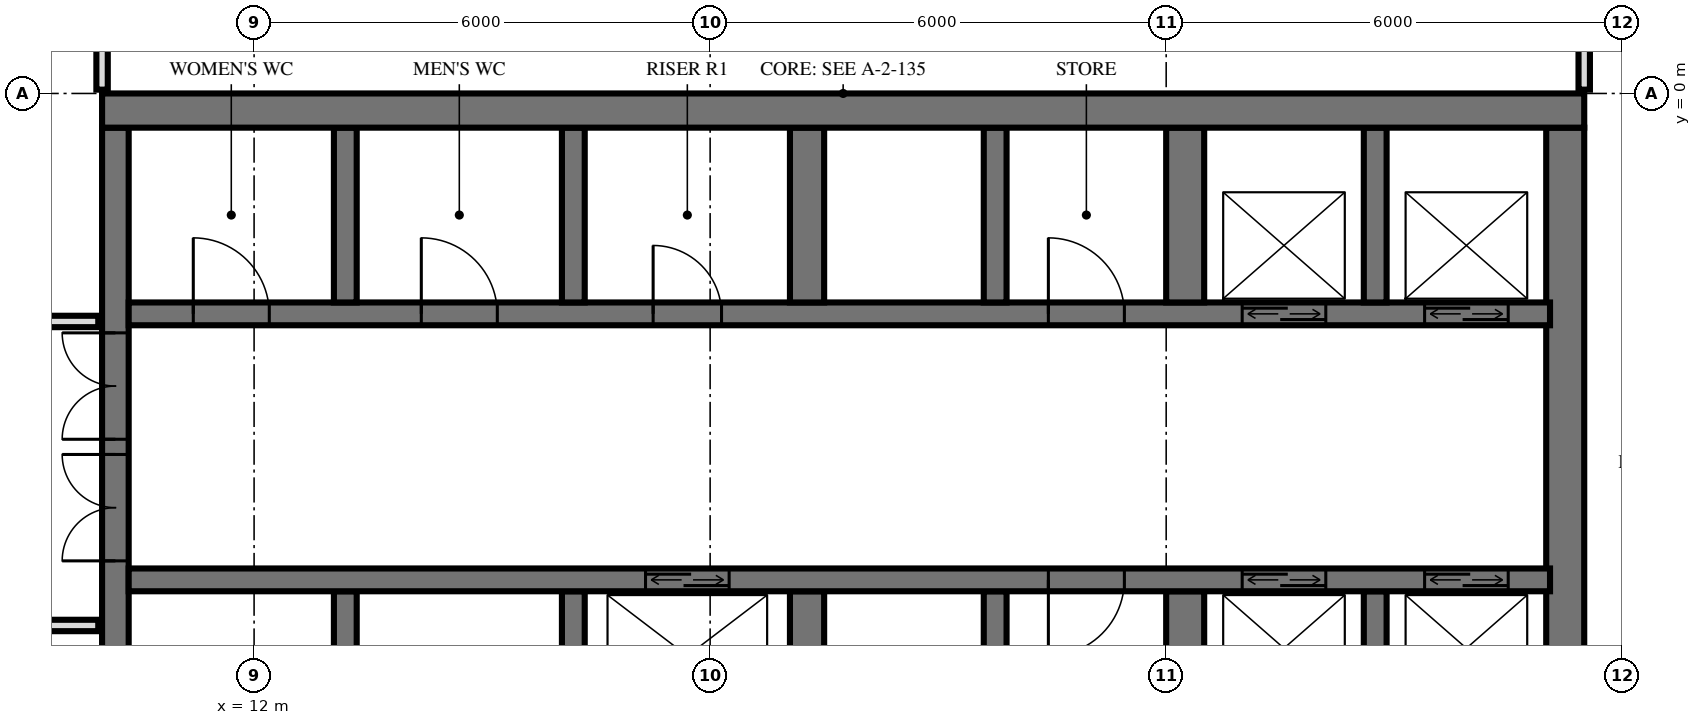
"""IFC4 building model, lengths in metres.
Left out: names, types, materials, properties, quantities, classifications, styles, units other than length and angle.
Written with IfcOpenShell. Run it as: python <this file> out.ifc"""

import sys

from ifc_helpers import new_model, si_unit, direction, frame, frame_2d, origin, place, context, subcontext, project, spatial, rectangle, extrude, element, fill, save


model = new_model("IFC4")
c1 = context("Model", 3, precision=1e-05, world=origin(), true_north=direction((0.0, 1.0)))
c2 = subcontext(c1, "Body", "Model", "MODEL_VIEW")
j1 = project(units=[si_unit("LENGTHUNIT", "METRE"), si_unit("PLANEANGLEUNIT", "RADIAN")], contexts=[c1])
p1 = place(None, origin())
s1 = spatial("IfcSite", under=j1, at=p1, CompositionType="ELEMENT")
p2 = place(p1, origin())
s2 = spatial("IfcBuilding", under=s1, at=p2, CompositionType="ELEMENT")
p3 = place(p2, frame((0.0, 0.0, 56.4)))
s3 = spatial("IfcBuildingStorey", under=s2, at=p3, CompositionType="ELEMENT", Elevation=56.4)
p4 = place(p3, frame((10.0, -0.225, 0.0), z_axis=(0.0, 0.0, 1.0), x_axis=(1.0, 0.0, 0.0)))
e1 = element("IfcWall", 1, at=p4, inside=s3, PredefinedType="SHEAR", context=c2, shape_type="SweptSolid", body=[
    extrude(rectangle(XDim=19.5, YDim=0.45, at=frame_2d((9.75, 0.0))), origin(), (0.0, 0.0, 1.0), 3.6),
])
p5 = place(p3, frame((10.175, -14.55, 0.0), z_axis=(0.0, 0.0, 1.0), x_axis=(0.0, 1.0, 0.0)))
e2 = element("IfcWall", 2, at=p5, inside=s3, PredefinedType="SHEAR", context=c2, shape_type="SweptSolid", body=[
    extrude(rectangle(XDim=14.1, YDim=0.35, at=frame_2d((7.05, 0.0))), origin(), (0.0, 0.0, 1.0), 3.6),
])
p6 = place(p5, frame((8.4, 0.0, 0.0)))
e3 = element("IfcOpeningElement", 3, at=p6, cuts=e2, PredefinedType="OPENING", context=c2, shape_type="SweptSolid", body=[
    extrude(rectangle(XDim=1.4, YDim=2.4, at=frame_2d((0.7, 1.2))), frame((0.0, 0.185, 0.0), z_axis=(0.0, -1.0, 0.0), x_axis=(1.0, 0.0, 0.0)), (0.0, 0.0, 1.0), 0.37),
])
p7 = place(p5, frame((10.0, 0.0, 0.0)))
e4 = element("IfcOpeningElement", 4, at=p7, cuts=e2, PredefinedType="OPENING", context=c2, shape_type="SweptSolid", body=[
    extrude(rectangle(XDim=1.4, YDim=2.4, at=frame_2d((0.7, 1.2))), frame((0.0, 0.185, 0.0), z_axis=(0.0, -1.0, 0.0), x_axis=(1.0, 0.0, 0.0)), (0.0, 0.0, 1.0), 0.37),
])
p8 = place(p5, frame((4.0, 0.0, 0.0)))
e5 = element("IfcOpeningElement", 5, at=p8, cuts=e2, PredefinedType="OPENING", context=c2, shape_type="SweptSolid", body=[
    extrude(rectangle(XDim=1.2, YDim=2.1, at=frame_2d((0.6, 1.05))), frame((0.0, 0.185, 0.0), z_axis=(0.0, -1.0, 0.0), x_axis=(1.0, 0.0, 0.0)), (0.0, 0.0, 1.0), 0.37),
])
p9 = place(p3, frame((29.25, -14.55, 0.0), z_axis=(0.0, 0.0, 1.0), x_axis=(0.0, 1.0, 0.0)))
e6 = element("IfcWall", 6, at=p9, inside=s3, PredefinedType="SHEAR", context=c2, shape_type="SweptSolid", body=[
    extrude(rectangle(XDim=14.1, YDim=0.5, at=frame_2d((7.05, 0.0))), origin(), (0.0, 0.0, 1.0), 3.6),
])
p10 = place(p3, frame((10.35, -2.9, 0.0), z_axis=(0.0, 0.0, 1.0), x_axis=(1.0, 0.0, 0.0)))
e7 = element("IfcWall", 7, at=p10, inside=s3, PredefinedType="SHEAR", context=c2, shape_type="SweptSolid", body=[
    extrude(rectangle(XDim=18.7, YDim=0.3, at=frame_2d((9.35, 0.0))), origin(), (0.0, 0.0, 1.0), 3.6),
])
p11 = place(p10, frame((14.65, 0.0, 0.0)))
e8 = element("IfcOpeningElement", 8, at=p11, cuts=e7, PredefinedType="OPENING", context=c2, shape_type="SweptSolid", body=[
    extrude(rectangle(XDim=1.1, YDim=2.1, at=frame_2d((0.55, 1.05))), frame((0.0, 0.16, 0.0), z_axis=(0.0, -1.0, 0.0), x_axis=(1.0, 0.0, 0.0)), (0.0, 0.0, 1.0), 0.32),
])
p12 = place(p10, frame((17.05, 0.0, 0.0)))
e9 = element("IfcOpeningElement", 9, at=p12, cuts=e7, PredefinedType="OPENING", context=c2, shape_type="SweptSolid", body=[
    extrude(rectangle(XDim=1.1, YDim=2.1, at=frame_2d((0.55, 1.05))), frame((0.0, 0.16, 0.0), z_axis=(0.0, -1.0, 0.0), x_axis=(1.0, 0.0, 0.0)), (0.0, 0.0, 1.0), 0.32),
])
p13 = place(p10, frame((6.9, 0.0, 0.0)))
e10 = element("IfcOpeningElement", 10, at=p13, cuts=e7, PredefinedType="OPENING", context=c2, shape_type="SweptSolid", body=[
    extrude(rectangle(XDim=0.9, YDim=2.1, at=frame_2d((0.45, 1.05))), frame((0.0, 0.16, 0.0), z_axis=(0.0, -1.0, 0.0), x_axis=(1.0, 0.0, 0.0)), (0.0, 0.0, 1.0), 0.32),
])
p14 = place(p10, frame((0.85, 0.0, 0.0)))
e11 = element("IfcOpeningElement", 11, at=p14, cuts=e7, PredefinedType="OPENING", context=c2, shape_type="SweptSolid", body=[
    extrude(rectangle(XDim=1.0, YDim=2.1, at=frame_2d((0.5, 1.05))), frame((0.0, 0.16, 0.0), z_axis=(0.0, -1.0, 0.0), x_axis=(1.0, 0.0, 0.0)), (0.0, 0.0, 1.0), 0.32),
])
p15 = place(p10, frame((3.85, 0.0, 0.0)))
e12 = element("IfcOpeningElement", 12, at=p15, cuts=e7, PredefinedType="OPENING", context=c2, shape_type="SweptSolid", body=[
    extrude(rectangle(XDim=1.0, YDim=2.1, at=frame_2d((0.5, 1.05))), frame((0.0, 0.16, 0.0), z_axis=(0.0, -1.0, 0.0), x_axis=(1.0, 0.0, 0.0)), (0.0, 0.0, 1.0), 0.32),
])
p16 = place(p10, frame((12.1, 0.0, 0.0)))
e13 = element("IfcOpeningElement", 13, at=p16, cuts=e7, PredefinedType="OPENING", context=c2, shape_type="SweptSolid", body=[
    extrude(rectangle(XDim=1.0, YDim=2.1, at=frame_2d((0.5, 1.05))), frame((0.0, 0.16, 0.0), z_axis=(0.0, -1.0, 0.0), x_axis=(1.0, 0.0, 0.0)), (0.0, 0.0, 1.0), 0.32),
])
p17 = place(p3, frame((10.35, -6.4, 0.0), z_axis=(0.0, 0.0, 1.0), x_axis=(1.0, 0.0, 0.0)))
e14 = element("IfcWall", 14, at=p17, inside=s3, PredefinedType="SHEAR", context=c2, shape_type="SweptSolid", body=[
    extrude(rectangle(XDim=18.7, YDim=0.3, at=frame_2d((9.35, 0.0))), origin(), (0.0, 0.0, 1.0), 3.6),
])
p18 = place(p17, frame((14.65, 0.0, 0.0)))
e15 = element("IfcOpeningElement", 15, at=p18, cuts=e14, PredefinedType="OPENING", context=c2, shape_type="SweptSolid", body=[
    extrude(rectangle(XDim=1.1, YDim=2.1, at=frame_2d((0.55, 1.05))), frame((0.0, 0.16, 0.0), z_axis=(0.0, -1.0, 0.0), x_axis=(1.0, 0.0, 0.0)), (0.0, 0.0, 1.0), 0.32),
])
p19 = place(p17, frame((17.05, 0.0, 0.0)))
e16 = element("IfcOpeningElement", 16, at=p19, cuts=e14, PredefinedType="OPENING", context=c2, shape_type="SweptSolid", body=[
    extrude(rectangle(XDim=1.1, YDim=2.1, at=frame_2d((0.55, 1.05))), frame((0.0, 0.16, 0.0), z_axis=(0.0, -1.0, 0.0), x_axis=(1.0, 0.0, 0.0)), (0.0, 0.0, 1.0), 0.32),
])
p20 = place(p17, frame((6.8, 0.0, 0.0)))
e17 = element("IfcOpeningElement", 17, at=p20, cuts=e14, PredefinedType="OPENING", context=c2, shape_type="SweptSolid", body=[
    extrude(rectangle(XDim=1.1, YDim=2.1, at=frame_2d((0.55, 1.05))), frame((0.0, 0.16, 0.0), z_axis=(0.0, -1.0, 0.0), x_axis=(1.0, 0.0, 0.0)), (0.0, 0.0, 1.0), 0.32),
])
p21 = place(p17, frame((12.1, 0.0, 0.0)))
e18 = element("IfcOpeningElement", 18, at=p21, cuts=e14, PredefinedType="OPENING", context=c2, shape_type="SweptSolid", body=[
    extrude(rectangle(XDim=1.0, YDim=2.1, at=frame_2d((0.5, 1.05))), frame((0.0, 0.16, 0.0), z_axis=(0.0, -1.0, 0.0), x_axis=(1.0, 0.0, 0.0)), (0.0, 0.0, 1.0), 0.32),
])
for number, where, z_axis, x_axis in (
    (19, (13.2, -2.75, 0.0), (0.0, 0.0, 1.0), (0.0, 1.0, 0.0)),
    (20, (13.2, -8.85, 0.0), (0.0, 0.0, 1.0), (0.0, 1.0, 0.0)),
    (21, (16.2, -2.75, 0.0), (0.0, 0.0, 1.0), (0.0, 1.0, 0.0)),
    (22, (16.2, -8.85, 0.0), (0.0, 0.0, 1.0), (0.0, 1.0, 0.0)),
):
    element("IfcWall", number, at=place(p3, frame(where, z_axis=z_axis, x_axis=x_axis)), inside=s3, PredefinedType="SHEAR", context=c2, shape_type="SweptSolid", body=[
        extrude(rectangle(XDim=2.3, YDim=0.3, at=frame_2d((1.15, 0.0))), origin(), (0.0, 0.0, 1.0), 3.6),
    ])
for number, where, z_axis, x_axis in (
    (23, (19.275, -2.75, 0.0), (0.0, 0.0, 1.0), (0.0, 1.0, 0.0)),
    (24, (19.275, -8.85, 0.0), (0.0, 0.0, 1.0), (0.0, 1.0, 0.0)),
):
    element("IfcWall", number, at=place(p3, frame(where, z_axis=z_axis, x_axis=x_axis)), inside=s3, PredefinedType="SHEAR", context=c2, shape_type="SweptSolid", body=[
        extrude(rectangle(XDim=2.3, YDim=0.45, at=frame_2d((1.15, 0.0))), origin(), (0.0, 0.0, 1.0), 3.6),
    ])
for number, where, z_axis, x_axis in (
    (25, (21.75, -2.75, 0.0), (0.0, 0.0, 1.0), (0.0, 1.0, 0.0)),
    (26, (21.75, -8.85, 0.0), (0.0, 0.0, 1.0), (0.0, 1.0, 0.0)),
):
    element("IfcWall", number, at=place(p3, frame(where, z_axis=z_axis, x_axis=x_axis)), inside=s3, PredefinedType="SHEAR", context=c2, shape_type="SweptSolid", body=[
        extrude(rectangle(XDim=2.3, YDim=0.3, at=frame_2d((1.15, 0.0))), origin(), (0.0, 0.0, 1.0), 3.6),
    ])
for number, where, z_axis, x_axis in (
    (27, (24.25, -2.75, 0.0), (0.0, 0.0, 1.0), (0.0, 1.0, 0.0)),
    (28, (24.25, -8.85, 0.0), (0.0, 0.0, 1.0), (0.0, 1.0, 0.0)),
):
    element("IfcWall", number, at=place(p3, frame(where, z_axis=z_axis, x_axis=x_axis)), inside=s3, PredefinedType="SHEAR", context=c2, shape_type="SweptSolid", body=[
        extrude(rectangle(XDim=2.3, YDim=0.5, at=frame_2d((1.15, 0.0))), origin(), (0.0, 0.0, 1.0), 3.6),
    ])
for number, where, z_axis, x_axis in (
    (29, (26.75, -2.75, 0.0), (0.0, 0.0, 1.0), (0.0, 1.0, 0.0)),
    (30, (26.75, -8.85, 0.0), (0.0, 0.0, 1.0), (0.0, 1.0, 0.0)),
):
    element("IfcWall", number, at=place(p3, frame(where, z_axis=z_axis, x_axis=x_axis)), inside=s3, PredefinedType="SHEAR", context=c2, shape_type="SweptSolid", body=[
        extrude(rectangle(XDim=2.3, YDim=0.3, at=frame_2d((1.15, 0.0))), origin(), (0.0, 0.0, 1.0), 3.6),
    ])
p22 = place(p3, frame((29.5, 0.05, 0.0), z_axis=(0.0, 0.0, 1.0), x_axis=(0.0, 1.0, 0.0)))
e31 = element("IfcWall", 31, at=p22, inside=s3, PredefinedType="PARTITIONING", context=c2, shape_type="SweptSolid", body=[
    extrude(rectangle(XDim=0.827, YDim=0.15, at=frame_2d((0.414, 0.0))), origin(), (0.0, 0.0, 1.0), 3.32),
])
p23 = place(p3, frame((10.0, 0.05, 0.0), z_axis=(0.0, 0.0, 1.0), x_axis=(0.0, 1.0, 0.0)))
e32 = element("IfcWall", 32, at=p23, inside=s3, PredefinedType="PARTITIONING", context=c2, shape_type="SweptSolid", body=[
    extrude(rectangle(XDim=0.97, YDim=0.15, at=frame_2d((0.485, 0.0))), origin(), (0.0, 0.0, 1.0), 3.32),
])
p24 = place(p3, frame((-9.95, -7.0, 0.0), z_axis=(0.0, 0.0, 1.0), x_axis=(1.0, 0.0, 0.0)))
e33 = element("IfcWall", 33, at=p24, inside=s3, PredefinedType="PARTITIONING", context=c2, shape_type="SweptSolid", body=[
    extrude(rectangle(XDim=19.9, YDim=0.15, at=frame_2d((9.95, 0.0))), origin(), (0.0, 0.0, 1.0), 3.32),
])
p25 = place(p24, frame((9.45, 0.0, 0.0)))
e34 = element("IfcOpeningElement", 34, at=p25, cuts=e33, PredefinedType="OPENING", context=c2, shape_type="SweptSolid", body=[
    extrude(rectangle(XDim=1.0, YDim=2.1, at=frame_2d((0.5, 1.05))), frame((0.0, 0.085, 0.0), z_axis=(0.0, -1.0, 0.0), x_axis=(1.0, 0.0, 0.0)), (0.0, 0.0, 1.0), 0.17),
])
p26 = place(p24, frame((15.45, 0.0, 0.0)))
e35 = element("IfcOpeningElement", 35, at=p26, cuts=e33, PredefinedType="OPENING", context=c2, shape_type="SweptSolid", body=[
    extrude(rectangle(XDim=1.0, YDim=2.1, at=frame_2d((0.5, 1.05))), frame((0.0, 0.085, 0.0), z_axis=(0.0, -1.0, 0.0), x_axis=(1.0, 0.0, 0.0)), (0.0, 0.0, 1.0), 0.17),
])
p27 = place(p3, frame((-9.95, -3.0, 0.0), z_axis=(0.0, 0.0, 1.0), x_axis=(1.0, 0.0, 0.0)))
e36 = element("IfcWall", 36, at=p27, inside=s3, PredefinedType="PARTITIONING", context=c2, shape_type="SweptSolid", body=[
    extrude(rectangle(XDim=19.9, YDim=0.15, at=frame_2d((9.95, 0.0))), origin(), (0.0, 0.0, 1.0), 3.32),
])
p28 = place(p27, frame((0.95, 0.0, 0.0)))
e37 = element("IfcOpeningElement", 37, at=p28, cuts=e36, PredefinedType="OPENING", context=c2, shape_type="SweptSolid", body=[
    extrude(rectangle(XDim=1.0, YDim=2.1, at=frame_2d((0.5, 1.05))), frame((0.0, 0.085, 0.0), z_axis=(0.0, -1.0, 0.0), x_axis=(1.0, 0.0, 0.0)), (0.0, 0.0, 1.0), 0.17),
])
p29 = place(p27, frame((3.7, 0.0, 0.0)))
e38 = element("IfcOpeningElement", 38, at=p29, cuts=e36, PredefinedType="OPENING", context=c2, shape_type="SweptSolid", body=[
    extrude(rectangle(XDim=1.0, YDim=2.1, at=frame_2d((0.5, 1.05))), frame((0.0, 0.085, 0.0), z_axis=(0.0, -1.0, 0.0), x_axis=(1.0, 0.0, 0.0)), (0.0, 0.0, 1.0), 0.17),
])
p30 = place(p27, frame((7.95, 0.0, 0.0)))
e39 = element("IfcOpeningElement", 39, at=p30, cuts=e36, PredefinedType="OPENING", context=c2, shape_type="SweptSolid", body=[
    extrude(rectangle(XDim=1.0, YDim=2.1, at=frame_2d((0.5, 1.05))), frame((0.0, 0.085, 0.0), z_axis=(0.0, -1.0, 0.0), x_axis=(1.0, 0.0, 0.0)), (0.0, 0.0, 1.0), 0.17),
])
p31 = place(p27, frame((15.2, 0.0, 0.0)))
e40 = element("IfcOpeningElement", 40, at=p31, cuts=e36, PredefinedType="OPENING", context=c2, shape_type="SweptSolid", body=[
    extrude(rectangle(XDim=1.0, YDim=2.1, at=frame_2d((0.5, 1.05))), frame((0.0, 0.085, 0.0), z_axis=(0.0, -1.0, 0.0), x_axis=(1.0, 0.0, 0.0)), (0.0, 0.0, 1.0), 0.17),
])
p32 = place(p11, origin())
e41 = element("IfcDoor", 41, at=p32, inside=s3, OperationType="DOUBLE_DOOR_SLIDING", PredefinedType="USERDEFINED", context=c2, shape_type="SweptSolid", body=[
    extrude(rectangle(XDim=1.1, YDim=2.1, at=frame_2d((0.55, 1.05))), frame((0.0, 0.025, 0.0), z_axis=(0.0, -1.0, 0.0), x_axis=(1.0, 0.0, 0.0)), (0.0, 0.0, 1.0), 0.05),
])
fill(e8, e41)
p33 = place(p12, origin())
e42 = element("IfcDoor", 42, at=p33, inside=s3, OperationType="DOUBLE_DOOR_SLIDING", PredefinedType="USERDEFINED", context=c2, shape_type="SweptSolid", body=[
    extrude(rectangle(XDim=1.1, YDim=2.1, at=frame_2d((0.55, 1.05))), frame((0.0, 0.025, 0.0), z_axis=(0.0, -1.0, 0.0), x_axis=(1.0, 0.0, 0.0)), (0.0, 0.0, 1.0), 0.05),
])
fill(e9, e42)
p34 = place(p18, origin())
e43 = element("IfcDoor", 43, at=p34, inside=s3, OperationType="DOUBLE_DOOR_SLIDING", PredefinedType="USERDEFINED", context=c2, shape_type="SweptSolid", body=[
    extrude(rectangle(XDim=1.1, YDim=2.1, at=frame_2d((0.55, 1.05))), frame((0.0, 0.025, 0.0), z_axis=(0.0, -1.0, 0.0), x_axis=(1.0, 0.0, 0.0)), (0.0, 0.0, 1.0), 0.05),
])
fill(e15, e43)
p35 = place(p19, origin())
e44 = element("IfcDoor", 44, at=p35, inside=s3, OperationType="DOUBLE_DOOR_SLIDING", PredefinedType="USERDEFINED", context=c2, shape_type="SweptSolid", body=[
    extrude(rectangle(XDim=1.1, YDim=2.1, at=frame_2d((0.55, 1.05))), frame((0.0, 0.025, 0.0), z_axis=(0.0, -1.0, 0.0), x_axis=(1.0, 0.0, 0.0)), (0.0, 0.0, 1.0), 0.05),
])
fill(e16, e44)
p36 = place(p20, origin())
e45 = element("IfcDoor", 45, at=p36, inside=s3, OperationType="DOUBLE_DOOR_SLIDING", PredefinedType="USERDEFINED", context=c2, shape_type="SweptSolid", body=[
    extrude(rectangle(XDim=1.1, YDim=2.1, at=frame_2d((0.55, 1.05))), frame((0.0, 0.025, 0.0), z_axis=(0.0, -1.0, 0.0), x_axis=(1.0, 0.0, 0.0)), (0.0, 0.0, 1.0), 0.05),
])
fill(e17, e45)
p37 = place(p6, origin())
e46 = element("IfcDoor", 46, at=p37, inside=s3, OperationType="DOUBLE_DOOR_SINGLE_SWING", PredefinedType="DOOR", context=c2, shape_type="SweptSolid", body=[
    extrude(rectangle(XDim=1.4, YDim=2.4, at=frame_2d((0.7, 1.2))), frame((0.0, 0.025, 0.0), z_axis=(0.0, -1.0, 0.0), x_axis=(1.0, 0.0, 0.0)), (0.0, 0.0, 1.0), 0.05),
])
fill(e3, e46)
p38 = place(p7, origin())
e47 = element("IfcDoor", 47, at=p38, inside=s3, OperationType="DOUBLE_DOOR_SINGLE_SWING", PredefinedType="DOOR", context=c2, shape_type="SweptSolid", body=[
    extrude(rectangle(XDim=1.4, YDim=2.4, at=frame_2d((0.7, 1.2))), frame((0.0, 0.025, 0.0), z_axis=(0.0, -1.0, 0.0), x_axis=(1.0, 0.0, 0.0)), (0.0, 0.0, 1.0), 0.05),
])
fill(e4, e47)
p39 = place(p13, origin())
e48 = element("IfcDoor", 48, at=p39, inside=s3, OperationType="SINGLE_SWING_RIGHT", PredefinedType="DOOR", context=c2, shape_type="SweptSolid", body=[
    extrude(rectangle(XDim=0.9, YDim=2.1, at=frame_2d((0.45, 1.05))), frame((0.0, 0.025, 0.0), z_axis=(0.0, -1.0, 0.0), x_axis=(1.0, 0.0, 0.0)), (0.0, 0.0, 1.0), 0.05),
])
fill(e10, e48)
p40 = place(p14, origin())
e49 = element("IfcDoor", 49, at=p40, inside=s3, OperationType="SINGLE_SWING_RIGHT", PredefinedType="DOOR", context=c2, shape_type="SweptSolid", body=[
    extrude(rectangle(XDim=1.0, YDim=2.1, at=frame_2d((0.5, 1.05))), frame((0.0, 0.025, 0.0), z_axis=(0.0, -1.0, 0.0), x_axis=(1.0, 0.0, 0.0)), (0.0, 0.0, 1.0), 0.05),
])
fill(e11, e49)
p41 = place(p15, origin())
e50 = element("IfcDoor", 50, at=p41, inside=s3, OperationType="SINGLE_SWING_RIGHT", PredefinedType="DOOR", context=c2, shape_type="SweptSolid", body=[
    extrude(rectangle(XDim=1.0, YDim=2.1, at=frame_2d((0.5, 1.05))), frame((0.0, 0.025, 0.0), z_axis=(0.0, -1.0, 0.0), x_axis=(1.0, 0.0, 0.0)), (0.0, 0.0, 1.0), 0.05),
])
fill(e12, e50)
p42 = place(p16, origin())
e51 = element("IfcDoor", 51, at=p42, inside=s3, OperationType="SINGLE_SWING_RIGHT", PredefinedType="DOOR", context=c2, shape_type="SweptSolid", body=[
    extrude(rectangle(XDim=1.0, YDim=2.1, at=frame_2d((0.5, 1.05))), frame((0.0, 0.025, 0.0), z_axis=(0.0, -1.0, 0.0), x_axis=(1.0, 0.0, 0.0)), (0.0, 0.0, 1.0), 0.05),
])
fill(e13, e51)
p43 = place(p21, frame((0.5, 0.0, 0.0), z_axis=(0.0, 0.0, 1.0), x_axis=(-1.0, 0.0, 0.0)))
e52 = element("IfcDoor", 52, at=p43, inside=s3, OperationType="SINGLE_SWING_LEFT", PredefinedType="DOOR", context=c2, shape_type="SweptSolid", body=[
    extrude(rectangle(XDim=1.0, YDim=2.1, at=frame_2d((0.0, 1.05))), frame((0.0, -0.025, 0.0), z_axis=(0.0, 1.0, 0.0), x_axis=(-1.0, 0.0, 0.0)), (0.0, 0.0, 1.0), 0.05),
])
fill(e18, e52)
save(model, sys.argv[1])
